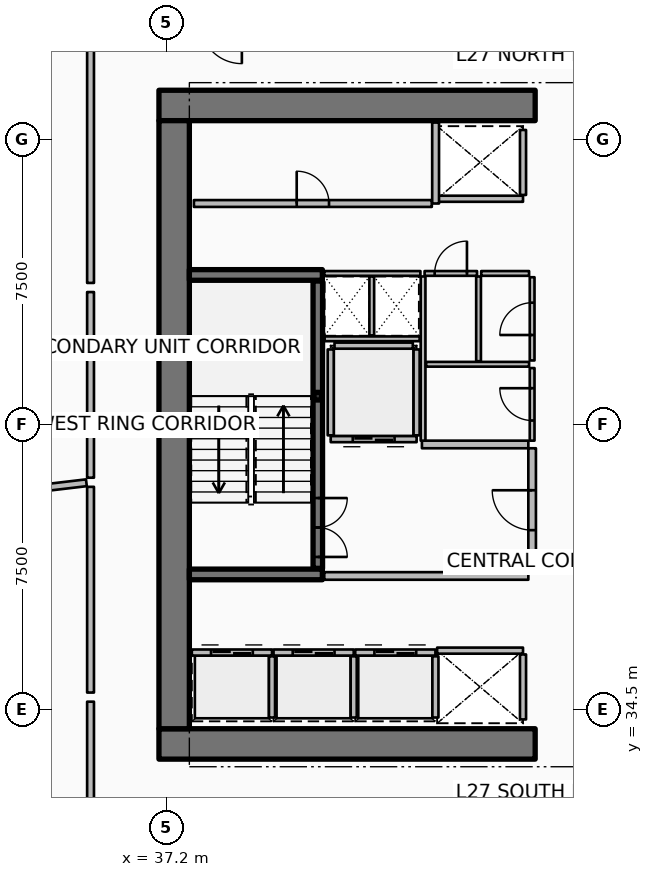
"""IFC4 building model, lengths in metres.
Left out: names, types, materials, properties, quantities, classifications, styles, units other than length and angle.
Written with IfcOpenShell. Run it as: python <this file> out.ifc"""

import sys

from ifc_helpers import new_model, si_unit, direction, frame, frame_2d, origin, origin_2d, place, context, subcontext, project, spatial, rectangle, hollow_rectangle, extrude, element, fill, save


model = new_model("IFC4")
c1 = context("Model", 3, precision=1e-05, world=origin(), true_north=direction((0.0, 1.0)))
c2 = subcontext(c1, "Body", "Model", "MODEL_VIEW")
j1 = project(units=[si_unit("LENGTHUNIT", "METRE"), si_unit("PLANEANGLEUNIT", "RADIAN")], contexts=[c1])
p1 = place(None, origin())
s1 = spatial("IfcSite", under=j1, at=p1, CompositionType="ELEMENT")
p2 = place(p1, origin())
s2 = spatial("IfcBuilding", under=s1, at=p2, CompositionType="ELEMENT")
p3 = place(p2, frame((0.0, 0.0, 108.9)))
s3 = spatial("IfcBuildingStorey", under=s2, at=p3, CompositionType="ELEMENT", Elevation=108.9)
for number, where, z_axis, x_axis in (
    (1, (37.0, 33.6, 0.0), (0.0, 0.0, 1.0), (1.0, 0.0, 0.0)),
    (2, (37.0, 50.4, 0.0), (0.0, 0.0, 1.0), (1.0, 0.0, 0.0)),
):
    element("IfcWall", number, at=place(p3, frame(where, z_axis=z_axis, x_axis=x_axis)), inside=s3, PredefinedType="SHEAR", context=c2, shape_type="SweptSolid", body=[
        extrude(rectangle(XDim=9.9, YDim=0.8, at=frame_2d((4.95, 0.0))), origin(), (0.0, 0.0, 1.0), 3.75),
    ])
p4 = place(p3, frame((37.4, 34.0, 0.0), z_axis=(0.0, 0.0, 1.0), x_axis=(0.0, 1.0, 0.0)))
e3 = element("IfcWall", 3, at=p4, inside=s3, PredefinedType="SHEAR", context=c2, shape_type="SweptSolid", body=[
    extrude(rectangle(XDim=16.0, YDim=0.8, at=frame_2d((8.0, 0.0))), origin(), (0.0, 0.0, 1.0), 3.75),
])
for number, where, z_axis, x_axis in (
    (4, (37.8, 38.06, 0.0), (0.0, 0.0, 1.0), (1.0, 0.0, 0.0)),
    (5, (37.8, 45.94, 0.0), (0.0, 0.0, 1.0), (1.0, 0.0, 0.0)),
):
    element("IfcWall", number, at=place(p3, frame(where, z_axis=z_axis, x_axis=x_axis)), inside=s3, PredefinedType="SHEAR", context=c2, shape_type="SweptSolid", body=[
        extrude(rectangle(XDim=3.5, YDim=0.28, at=frame_2d((1.75, 0.0))), origin(), (0.0, 0.0, 1.0), 3.75),
    ])
p5 = place(p3, frame((41.18, 42.75, 0.0), z_axis=(0.0, 0.0, 1.0), x_axis=(1.0, 0.0, 0.0)))
e6 = element("IfcColumn", 6, at=p5, inside=s3, PredefinedType="COLUMN", context=c2, shape_type="SweptSolid", body=[
    extrude(hollow_rectangle(XDim=0.2, YDim=0.2, WallThickness=0.01, InnerFilletRadius=0.01, OuterFilletRadius=0.02, at=origin_2d()), origin(), (0.0, 0.0, 1.0), 1.67),
])
p6 = place(p3, frame((41.18, 38.22, 0.0), z_axis=(0.0, 0.0, 1.0), x_axis=(0.0, 1.0, 0.0)))
e7 = element("IfcWall", 7, at=p6, inside=s3, PredefinedType="SOLIDWALL", context=c2, shape_type="SweptSolid", body=[
    extrude(rectangle(XDim=7.56, YDim=0.25, at=frame_2d((3.78, 0.0))), origin(), (0.0, 0.0, 1.0), 3.5),
])
p7 = place(p6, frame((0.3, 0.0, 0.0)))
e8 = element("IfcOpeningElement", 8, at=p7, cuts=e7, PredefinedType="OPENING", context=c2, shape_type="SweptSolid", body=[
    extrude(rectangle(XDim=1.55, YDim=2.15, at=frame_2d((0.775, 1.075))), frame((0.0, 0.135, 0.0), z_axis=(0.0, -1.0, 0.0), x_axis=(1.0, 0.0, 0.0)), (0.0, 0.0, 1.0), 0.27),
])
p8 = place(p3, frame((37.865, 36.005, 0.0), z_axis=(0.0, 0.0, 1.0), x_axis=(1.0, 0.0, 0.0)))
e9 = element("IfcWall", 9, at=p8, inside=s3, PredefinedType="PARTITIONING", context=c2, shape_type="SweptSolid", body=[
    extrude(rectangle(XDim=2.11, YDim=0.16, at=frame_2d((1.055, 0.0))), origin(), (0.0, 0.0, 1.0), 3.5),
])
p9 = place(p8, frame((0.505, 0.0, 0.0)))
e10 = element("IfcOpeningElement", 10, at=p9, cuts=e9, PredefinedType="OPENING", context=c2, shape_type="SweptSolid", body=[
    extrude(rectangle(XDim=1.1, YDim=2.1, at=frame_2d((0.55, 1.05))), frame((0.0, 0.09, 0.0), z_axis=(0.0, -1.0, 0.0), x_axis=(1.0, 0.0, 0.0)), (0.0, 0.0, 1.0), 0.18),
])
p10 = place(p3, frame((39.975, 34.295, 0.0), z_axis=(0.0, 0.0, 1.0), x_axis=(0.0, 1.0, 0.0)))
e11 = element("IfcWall", 11, at=p10, inside=s3, PredefinedType="PARTITIONING", context=c2, shape_type="SweptSolid", body=[
    extrude(rectangle(XDim=1.61, YDim=0.16, at=frame_2d((0.805, 0.0))), origin(), (0.0, 0.0, 1.0), 3.5),
])
p11 = place(p3, frame((40.015, 36.005, 0.0), z_axis=(0.0, 0.0, 1.0), x_axis=(1.0, 0.0, 0.0)))
e12 = element("IfcWall", 12, at=p11, inside=s3, PredefinedType="PARTITIONING", context=c2, shape_type="SweptSolid", body=[
    extrude(rectangle(XDim=2.11, YDim=0.16, at=frame_2d((1.055, 0.0))), origin(), (0.0, 0.0, 1.0), 3.5),
])
p12 = place(p11, frame((0.505, 0.0, 0.0)))
e13 = element("IfcOpeningElement", 13, at=p12, cuts=e12, PredefinedType="OPENING", context=c2, shape_type="SweptSolid", body=[
    extrude(rectangle(XDim=1.1, YDim=2.1, at=frame_2d((0.55, 1.05))), frame((0.0, 0.09, 0.0), z_axis=(0.0, -1.0, 0.0), x_axis=(1.0, 0.0, 0.0)), (0.0, 0.0, 1.0), 0.18),
])
p13 = place(p3, frame((42.125, 34.295, 0.0), z_axis=(0.0, 0.0, 1.0), x_axis=(0.0, 1.0, 0.0)))
e14 = element("IfcWall", 14, at=p13, inside=s3, PredefinedType="PARTITIONING", context=c2, shape_type="SweptSolid", body=[
    extrude(rectangle(XDim=1.61, YDim=0.16, at=frame_2d((0.805, 0.0))), origin(), (0.0, 0.0, 1.0), 3.5),
])
p14 = place(p3, frame((42.165, 36.005, 0.0), z_axis=(0.0, 0.0, 1.0), x_axis=(1.0, 0.0, 0.0)))
e15 = element("IfcWall", 15, at=p14, inside=s3, PredefinedType="PARTITIONING", context=c2, shape_type="SweptSolid", body=[
    extrude(rectangle(XDim=2.11, YDim=0.16, at=frame_2d((1.055, 0.0))), origin(), (0.0, 0.0, 1.0), 3.5),
])
p15 = place(p14, frame((0.505, 0.0, 0.0)))
e16 = element("IfcOpeningElement", 16, at=p15, cuts=e15, PredefinedType="OPENING", context=c2, shape_type="SweptSolid", body=[
    extrude(rectangle(XDim=1.1, YDim=2.1, at=frame_2d((0.55, 1.05))), frame((0.0, 0.09, 0.0), z_axis=(0.0, -1.0, 0.0), x_axis=(1.0, 0.0, 0.0)), (0.0, 0.0, 1.0), 0.18),
])
p16 = place(p3, frame((44.275, 34.295, 0.0), z_axis=(0.0, 0.0, 1.0), x_axis=(0.0, 1.0, 0.0)))
e17 = element("IfcWall", 17, at=p16, inside=s3, PredefinedType="PARTITIONING", context=c2, shape_type="SweptSolid", body=[
    extrude(rectangle(XDim=1.61, YDim=0.16, at=frame_2d((0.805, 0.0))), origin(), (0.0, 0.0, 1.0), 3.5),
])
p17 = place(p3, frame((46.58, 47.945, 0.0), z_axis=(0.0, 0.0, 1.0), x_axis=(-1.0, 0.0, 0.0)))
e18 = element("IfcWall", 18, at=p17, inside=s3, PredefinedType="PARTITIONING", context=c2, shape_type="SweptSolid", body=[
    extrude(rectangle(XDim=2.26, YDim=0.16, at=frame_2d((1.13, 0.0))), origin(), (0.0, 0.0, 1.0), 3.5),
])
p18 = place(p3, frame((46.58, 48.045, 0.0), z_axis=(0.0, 0.0, 1.0), x_axis=(0.0, 1.0, 0.0)))
e19 = element("IfcWall", 19, at=p18, inside=s3, PredefinedType="PARTITIONING", context=c2, shape_type="SweptSolid", body=[
    extrude(rectangle(XDim=1.71, YDim=0.16, at=frame_2d((0.855, 0.0))), origin(), (0.0, 0.0, 1.0), 3.5),
])
p19 = place(p3, frame((44.32, 36.055, 0.0), z_axis=(0.0, 0.0, 1.0), x_axis=(1.0, 0.0, 0.0)))
e20 = element("IfcWall", 20, at=p19, inside=s3, PredefinedType="PARTITIONING", context=c2, shape_type="SweptSolid", body=[
    extrude(rectangle(XDim=2.26, YDim=0.16, at=frame_2d((1.13, 0.0))), origin(), (0.0, 0.0, 1.0), 3.5),
])
p20 = place(p3, frame((46.58, 34.245, 0.0), z_axis=(0.0, 0.0, 1.0), x_axis=(0.0, 1.0, 0.0)))
e21 = element("IfcWall", 21, at=p20, inside=s3, PredefinedType="PARTITIONING", context=c2, shape_type="SweptSolid", body=[
    extrude(rectangle(XDim=1.71, YDim=0.16, at=frame_2d((0.855, 0.0))), origin(), (0.0, 0.0, 1.0), 3.5),
])
p21 = place(p3, frame((43.78, 41.62, 0.0), z_axis=(0.0, 0.0, 1.0), x_axis=(-1.0, 0.0, 0.0)))
e22 = element("IfcWall", 22, at=p21, inside=s3, PredefinedType="PARTITIONING", context=c2, shape_type="SweptSolid", body=[
    extrude(rectangle(XDim=2.26, YDim=0.16, at=frame_2d((1.13, 0.0))), origin(), (0.0, 0.0, 1.0), 3.5),
])
p22 = place(p21, frame((0.58, 0.0, 0.0)))
e23 = element("IfcOpeningElement", 23, at=p22, cuts=e22, PredefinedType="OPENING", context=c2, shape_type="SweptSolid", body=[
    extrude(rectangle(XDim=1.1, YDim=2.1, at=frame_2d((0.55, 1.05))), frame((0.0, 0.09, 0.0), z_axis=(0.0, -1.0, 0.0), x_axis=(1.0, 0.0, 0.0)), (0.0, 0.0, 1.0), 0.18),
])
for number, where, z_axis, x_axis in (
    (24, (43.78, 41.72, 0.0), (0.0, 0.0, 1.0), (0.0, 1.0, 0.0)),
    (25, (41.52, 41.72, 0.0), (0.0, 0.0, 1.0), (0.0, 1.0, 0.0)),
):
    element("IfcWall", number, at=place(p3, frame(where, z_axis=z_axis, x_axis=x_axis)), inside=s3, PredefinedType="PARTITIONING", context=c2, shape_type="SweptSolid", body=[
        extrude(rectangle(XDim=2.26, YDim=0.16, at=frame_2d((1.13, 0.0))), origin(), (0.0, 0.0, 1.0), 3.5),
    ])
p23 = place(p3, frame((41.62, 44.08, 0.0), z_axis=(0.0, 0.0, 1.0), x_axis=(1.0, 0.0, 0.0)))
e26 = element("IfcWall", 26, at=p23, inside=s3, PredefinedType="PARTITIONING", context=c2, shape_type="SweptSolid", body=[
    extrude(rectangle(XDim=2.06, YDim=0.16, at=frame_2d((1.03, 0.0))), origin(), (0.0, 0.0, 1.0), 3.5),
])
p24 = place(p3, frame((37.92, 47.82, 0.0), z_axis=(0.0, 0.0, 1.0), x_axis=(1.0, 0.0, 0.0)))
e27 = element("IfcWall", 27, at=p24, inside=s3, PredefinedType="PARTITIONING", context=c2, shape_type="SweptSolid", body=[
    extrude(rectangle(XDim=6.26, YDim=0.18, at=frame_2d((3.13, 0.0))), origin(), (0.0, 0.0, 1.0), 3.5),
])
p25 = place(p24, frame((2.705, 0.0, 0.0)))
e28 = element("IfcOpeningElement", 28, at=p25, cuts=e27, PredefinedType="OPENING", context=c2, shape_type="SweptSolid", body=[
    extrude(rectangle(XDim=0.85, YDim=2.06, at=frame_2d((0.425, 1.03))), frame((0.0, 0.1, 0.0), z_axis=(0.0, -1.0, 0.0), x_axis=(1.0, 0.0, 0.0)), (0.0, 0.0, 1.0), 0.2),
])
p26 = place(p3, frame((44.28, 47.82, 0.0), z_axis=(0.0, 0.0, 1.0), x_axis=(0.0, 1.0, 0.0)))
e29 = element("IfcWall", 29, at=p26, inside=s3, PredefinedType="PARTITIONING", context=c2, shape_type="SweptSolid", body=[
    extrude(rectangle(XDim=2.13, YDim=0.18, at=frame_2d((1.065, 0.0))), origin(), (0.0, 0.0, 1.0), 3.5),
])
p27 = place(p3, frame((41.35, 38.02, 0.0), z_axis=(0.0, 0.0, 1.0), x_axis=(1.0, 0.0, 0.0)))
e30 = element("IfcWall", 30, at=p27, inside=s3, PredefinedType="PARTITIONING", context=c2, shape_type="SweptSolid", body=[
    extrude(rectangle(XDim=5.37, YDim=0.2, at=frame_2d((2.685, 0.0))), origin(), (0.0, 0.0, 1.0), 3.5),
])
p28 = place(p3, frame((43.92, 41.48, 0.0), z_axis=(0.0, 0.0, 1.0), x_axis=(1.0, 0.0, 0.0)))
e31 = element("IfcWall", 31, at=p28, inside=s3, PredefinedType="PARTITIONING", context=c2, shape_type="SweptSolid", body=[
    extrude(rectangle(XDim=2.8, YDim=0.2, at=frame_2d((1.4, 0.0))), origin(), (0.0, 0.0, 1.0), 3.5),
])
p29 = place(p3, frame((46.82, 38.12, 0.0), z_axis=(0.0, 0.0, 1.0), x_axis=(0.0, 1.0, 0.0)))
e32 = element("IfcWall", 32, at=p29, inside=s3, PredefinedType="PARTITIONING", context=c2, shape_type="SweptSolid", body=[
    extrude(rectangle(XDim=3.26, YDim=0.2, at=frame_2d((1.63, 0.0))), origin(), (0.0, 0.0, 1.0), 3.5),
])
p30 = place(p29, frame((1.105, 0.0, 0.0)))
e33 = element("IfcOpeningElement", 33, at=p30, cuts=e32, PredefinedType="OPENING", context=c2, shape_type="SweptSolid", body=[
    extrude(rectangle(XDim=1.05, YDim=2.1, at=frame_2d((0.525, 1.05))), frame((0.0, 0.11, 0.0), z_axis=(0.0, -1.0, 0.0), x_axis=(1.0, 0.0, 0.0)), (0.0, 0.0, 1.0), 0.22),
])
p31 = place(p3, frame((41.36, 44.26, 0.0), z_axis=(0.0, 0.0, 1.0), x_axis=(1.0, 0.0, 0.0)))
e34 = element("IfcWall", 34, at=p31, inside=s3, PredefinedType="PARTITIONING", context=c2, shape_type="SweptSolid", body=[
    extrude(rectangle(XDim=2.5, YDim=0.125, at=frame_2d((1.25, 0.0))), origin(), (0.0, 0.0, 1.0), 2.94),
])
p32 = place(p3, frame((42.6, 44.35, 0.0), z_axis=(0.0, 0.0, 1.0), x_axis=(0.0, 1.0, 0.0)))
e35 = element("IfcWall", 35, at=p32, inside=s3, PredefinedType="PARTITIONING", context=c2, shape_type="SweptSolid", body=[
    extrude(rectangle(XDim=1.55, YDim=0.125, at=frame_2d((0.775, 0.0))), origin(), (0.0, 0.0, 1.0), 2.94),
])
p33 = place(p3, frame((43.95, 41.58, 0.0), z_axis=(0.0, 0.0, 1.0), x_axis=(0.0, 1.0, 0.0)))
e36 = element("IfcWall", 36, at=p33, inside=s3, PredefinedType="PARTITIONING", context=c2, shape_type="SweptSolid", body=[
    extrude(rectangle(XDim=4.32, YDim=0.125, at=frame_2d((2.16, 0.0))), origin(), (0.0, 0.0, 1.0), 2.94),
])
p34 = place(p3, frame((44.03, 43.59, 0.0), z_axis=(0.0, 0.0, 1.0), x_axis=(1.0, 0.0, 0.0)))
e37 = element("IfcWall", 37, at=p34, inside=s3, PredefinedType="PARTITIONING", context=c2, shape_type="SweptSolid", body=[
    extrude(rectangle(XDim=2.71, YDim=0.125, at=frame_2d((1.355, 0.0))), origin(), (0.0, 0.0, 1.0), 2.94),
])
p35 = place(p3, frame((45.41, 43.67, 0.0), z_axis=(0.0, 0.0, 1.0), x_axis=(0.0, 1.0, 0.0)))
e38 = element("IfcWall", 38, at=p35, inside=s3, PredefinedType="PARTITIONING", context=c2, shape_type="SweptSolid", body=[
    extrude(rectangle(XDim=2.23, YDim=0.125, at=frame_2d((1.115, 0.0))), origin(), (0.0, 0.0, 1.0), 2.94),
])
p36 = place(p3, frame((46.82, 41.58, 0.0), z_axis=(0.0, 0.0, 1.0), x_axis=(0.0, 1.0, 0.0)))
e39 = element("IfcWall", 39, at=p36, inside=s3, PredefinedType="PARTITIONING", context=c2, shape_type="SweptSolid", body=[
    extrude(rectangle(XDim=1.91, YDim=0.125, at=frame_2d((0.955, 0.0))), origin(), (0.0, 0.0, 1.0), 2.94),
])
p37 = place(p36, frame((0.53, 0.0, 0.0)))
e40 = element("IfcOpeningElement", 40, at=p37, cuts=e39, PredefinedType="OPENING", context=c2, shape_type="SweptSolid", body=[
    extrude(rectangle(XDim=0.85, YDim=2.06, at=frame_2d((0.425, 1.03))), frame((0.0, 0.073, 0.0), z_axis=(0.0, -1.0, 0.0), x_axis=(1.0, 0.0, 0.0)), (0.0, 0.0, 1.0), 0.145),
])
p38 = place(p3, frame((46.82, 43.69, 0.0), z_axis=(0.0, 0.0, 1.0), x_axis=(0.0, 1.0, 0.0)))
e41 = element("IfcWall", 41, at=p38, inside=s3, PredefinedType="PARTITIONING", context=c2, shape_type="SweptSolid", body=[
    extrude(rectangle(XDim=2.19, YDim=0.125, at=frame_2d((1.095, 0.0))), origin(), (0.0, 0.0, 1.0), 2.94),
])
p39 = place(p38, frame((0.67, 0.0, 0.0)))
e42 = element("IfcOpeningElement", 42, at=p39, cuts=e41, PredefinedType="OPENING", context=c2, shape_type="SweptSolid", body=[
    extrude(rectangle(XDim=0.85, YDim=2.06, at=frame_2d((0.425, 1.03))), frame((0.0, 0.073, 0.0), z_axis=(0.0, -1.0, 0.0), x_axis=(1.0, 0.0, 0.0)), (0.0, 0.0, 1.0), 0.145),
])
p40 = place(p3, frame((41.35, 45.98, 0.0), z_axis=(0.0, 0.0, 1.0), x_axis=(1.0, 0.0, 0.0)))
e43 = element("IfcWall", 43, at=p40, inside=s3, PredefinedType="PARTITIONING", context=c2, shape_type="SweptSolid", body=[
    extrude(rectangle(XDim=2.53, YDim=0.125, at=frame_2d((1.265, 0.0))), origin(), (0.0, 0.0, 1.0), 2.94),
])
p41 = place(p3, frame((43.99, 45.98, 0.0), z_axis=(0.0, 0.0, 1.0), x_axis=(1.0, 0.0, 0.0)))
e44 = element("IfcWall", 44, at=p41, inside=s3, PredefinedType="PARTITIONING", context=c2, shape_type="SweptSolid", body=[
    extrude(rectangle(XDim=1.38, YDim=0.125, at=frame_2d((0.69, 0.0))), origin(), (0.0, 0.0, 1.0), 2.94),
])
p42 = place(p41, frame((0.265, 0.0, 0.0)))
e45 = element("IfcOpeningElement", 45, at=p42, cuts=e44, PredefinedType="OPENING", context=c2, shape_type="SweptSolid", body=[
    extrude(rectangle(XDim=0.85, YDim=2.06, at=frame_2d((0.425, 1.03))), frame((0.0, 0.073, 0.0), z_axis=(0.0, -1.0, 0.0), x_axis=(1.0, 0.0, 0.0)), (0.0, 0.0, 1.0), 0.145),
])
p43 = place(p3, frame((45.48, 45.98, 0.0), z_axis=(0.0, 0.0, 1.0), x_axis=(1.0, 0.0, 0.0)))
e46 = element("IfcWall", 46, at=p43, inside=s3, PredefinedType="PARTITIONING", context=c2, shape_type="SweptSolid", body=[
    extrude(rectangle(XDim=1.26, YDim=0.125, at=frame_2d((0.63, 0.0))), origin(), (0.0, 0.0, 1.0), 2.94),
])
p44 = place(p3, frame((35.091, 40.472, 0.0), z_axis=(0.0, 0.0, 1.0), x_axis=(-0.99306845132, -0.117537445069, 0.0)))
e47 = element("IfcWall", 47, at=p44, inside=s3, PredefinedType="PARTITIONING", context=c2, shape_type="SweptSolid", body=[
    extrude(rectangle(XDim=16.48, YDim=0.18, at=frame_2d((8.24, 0.0))), origin(), (0.0, 0.0, 1.0), 2.94),
])
p45 = place(p3, frame((35.2, 51.971, 0.0), z_axis=(0.0, 0.0, 1.0), x_axis=(0.0, -1.0, 0.0)))
e48 = element("IfcWall", 48, at=p45, inside=s3, PredefinedType="PARTITIONING", context=c2, shape_type="SweptSolid", body=[
    extrude(rectangle(XDim=6.241, YDim=0.18, at=frame_2d((3.12, 0.0))), origin(), (0.0, 0.0, 1.0), 2.94),
])
p46 = place(p3, frame((35.2, 45.49, 0.0), z_axis=(0.0, 0.0, 1.0), x_axis=(0.0, -1.0, 0.0)))
e49 = element("IfcWall", 49, at=p46, inside=s3, PredefinedType="PARTITIONING", context=c2, shape_type="SweptSolid", body=[
    extrude(rectangle(XDim=4.885, YDim=0.18, at=frame_2d((2.442, 0.0))), origin(), (0.0, 0.0, 1.0), 2.94),
])
p47 = place(p3, frame((35.2, 40.365, 0.0), z_axis=(0.0, 0.0, 1.0), x_axis=(0.0, -1.0, 0.0)))
e50 = element("IfcWall", 50, at=p47, inside=s3, PredefinedType="PARTITIONING", context=c2, shape_type="SweptSolid", body=[
    extrude(rectangle(XDim=5.413, YDim=0.18, at=frame_2d((2.707, 0.0))), origin(), (0.0, 0.0, 1.0), 2.94),
])
p48 = place(p3, frame((35.2, 34.712, 0.0), z_axis=(0.0, 0.0, 1.0), x_axis=(0.0, -1.0, 0.0)))
e51 = element("IfcWall", 51, at=p48, inside=s3, PredefinedType="PARTITIONING", context=c2, shape_type="SweptSolid", body=[
    extrude(rectangle(XDim=3.192, YDim=0.18, at=frame_2d((1.596, 0.0))), origin(), (0.0, 0.0, 1.0), 2.94),
])
p49 = place(p7, origin())
e52 = element("IfcDoor", 52, at=p49, inside=s3, OperationType="DOUBLE_DOOR_SINGLE_SWING", PredefinedType="DOOR", context=c2, shape_type="SweptSolid", body=[
    extrude(rectangle(XDim=1.55, YDim=2.15, at=frame_2d((0.775, 1.075))), frame((0.0, 0.025, 0.0), z_axis=(0.0, -1.0, 0.0), x_axis=(1.0, 0.0, 0.0)), (0.0, 0.0, 1.0), 0.05),
])
fill(e8, e52)
p50 = place(p9, origin())
e53 = element("IfcDoor", 53, at=p50, inside=s3, OperationType="DOUBLE_DOOR_SLIDING", PredefinedType="DOOR", context=c2, shape_type="SweptSolid", body=[
    extrude(rectangle(XDim=1.1, YDim=2.1, at=frame_2d((0.55, 1.05))), frame((0.0, 0.025, 0.0), z_axis=(0.0, -1.0, 0.0), x_axis=(1.0, 0.0, 0.0)), (0.0, 0.0, 1.0), 0.05),
])
fill(e10, e53)
p51 = place(p12, origin())
e54 = element("IfcDoor", 54, at=p51, inside=s3, OperationType="DOUBLE_DOOR_SLIDING", PredefinedType="DOOR", context=c2, shape_type="SweptSolid", body=[
    extrude(rectangle(XDim=1.1, YDim=2.1, at=frame_2d((0.55, 1.05))), frame((0.0, 0.025, 0.0), z_axis=(0.0, -1.0, 0.0), x_axis=(1.0, 0.0, 0.0)), (0.0, 0.0, 1.0), 0.05),
])
fill(e13, e54)
p52 = place(p15, origin())
e55 = element("IfcDoor", 55, at=p52, inside=s3, OperationType="DOUBLE_DOOR_SLIDING", PredefinedType="DOOR", context=c2, shape_type="SweptSolid", body=[
    extrude(rectangle(XDim=1.1, YDim=2.1, at=frame_2d((0.55, 1.05))), frame((0.0, 0.025, 0.0), z_axis=(0.0, -1.0, 0.0), x_axis=(1.0, 0.0, 0.0)), (0.0, 0.0, 1.0), 0.05),
])
fill(e16, e55)
p53 = place(p22, origin())
e56 = element("IfcDoor", 56, at=p53, inside=s3, OperationType="DOUBLE_DOOR_SLIDING", PredefinedType="DOOR", context=c2, shape_type="SweptSolid", body=[
    extrude(rectangle(XDim=1.1, YDim=2.1, at=frame_2d((0.55, 1.05))), frame((0.0, 0.025, 0.0), z_axis=(0.0, -1.0, 0.0), x_axis=(1.0, 0.0, 0.0)), (0.0, 0.0, 1.0), 0.05),
])
fill(e23, e56)
p54 = place(p25, origin())
e57 = element("IfcDoor", 57, at=p54, inside=s3, OperationType="SINGLE_SWING_LEFT", PredefinedType="DOOR", context=c2, shape_type="SweptSolid", body=[
    extrude(rectangle(XDim=0.85, YDim=2.06, at=frame_2d((0.425, 1.03))), frame((0.0, 0.025, 0.0), z_axis=(0.0, -1.0, 0.0), x_axis=(1.0, 0.0, 0.0)), (0.0, 0.0, 1.0), 0.05),
])
fill(e28, e57)
p55 = place(p30, origin())
e58 = element("IfcDoor", 58, at=p55, inside=s3, OperationType="SINGLE_SWING_RIGHT", PredefinedType="DOOR", context=c2, shape_type="SweptSolid", body=[
    extrude(rectangle(XDim=1.05, YDim=2.1, at=frame_2d((0.525, 1.05))), frame((0.0, 0.025, 0.0), z_axis=(0.0, -1.0, 0.0), x_axis=(1.0, 0.0, 0.0)), (0.0, 0.0, 1.0), 0.05),
])
fill(e33, e58)
p56 = place(p37, origin())
e59 = element("IfcDoor", 59, at=p56, inside=s3, OperationType="SINGLE_SWING_RIGHT", PredefinedType="DOOR", context=c2, shape_type="SweptSolid", body=[
    extrude(rectangle(XDim=0.85, YDim=2.06, at=frame_2d((0.425, 1.03))), frame((0.0, 0.025, 0.0), z_axis=(0.0, -1.0, 0.0), x_axis=(1.0, 0.0, 0.0)), (0.0, 0.0, 1.0), 0.05),
])
fill(e40, e59)
p57 = place(p39, origin())
e60 = element("IfcDoor", 60, at=p57, inside=s3, OperationType="SINGLE_SWING_LEFT", PredefinedType="DOOR", context=c2, shape_type="SweptSolid", body=[
    extrude(rectangle(XDim=0.85, YDim=2.06, at=frame_2d((0.425, 1.03))), frame((0.0, 0.025, 0.0), z_axis=(0.0, -1.0, 0.0), x_axis=(1.0, 0.0, 0.0)), (0.0, 0.0, 1.0), 0.05),
])
fill(e42, e60)
p58 = place(p42, origin())
e61 = element("IfcDoor", 61, at=p58, inside=s3, OperationType="SINGLE_SWING_RIGHT", PredefinedType="DOOR", context=c2, shape_type="SweptSolid", body=[
    extrude(rectangle(XDim=0.85, YDim=2.06, at=frame_2d((0.425, 1.03))), frame((0.0, 0.025, 0.0), z_axis=(0.0, -1.0, 0.0), x_axis=(1.0, 0.0, 0.0)), (0.0, 0.0, 1.0), 0.05),
])
fill(e45, e61)
save(model, sys.argv[1])
